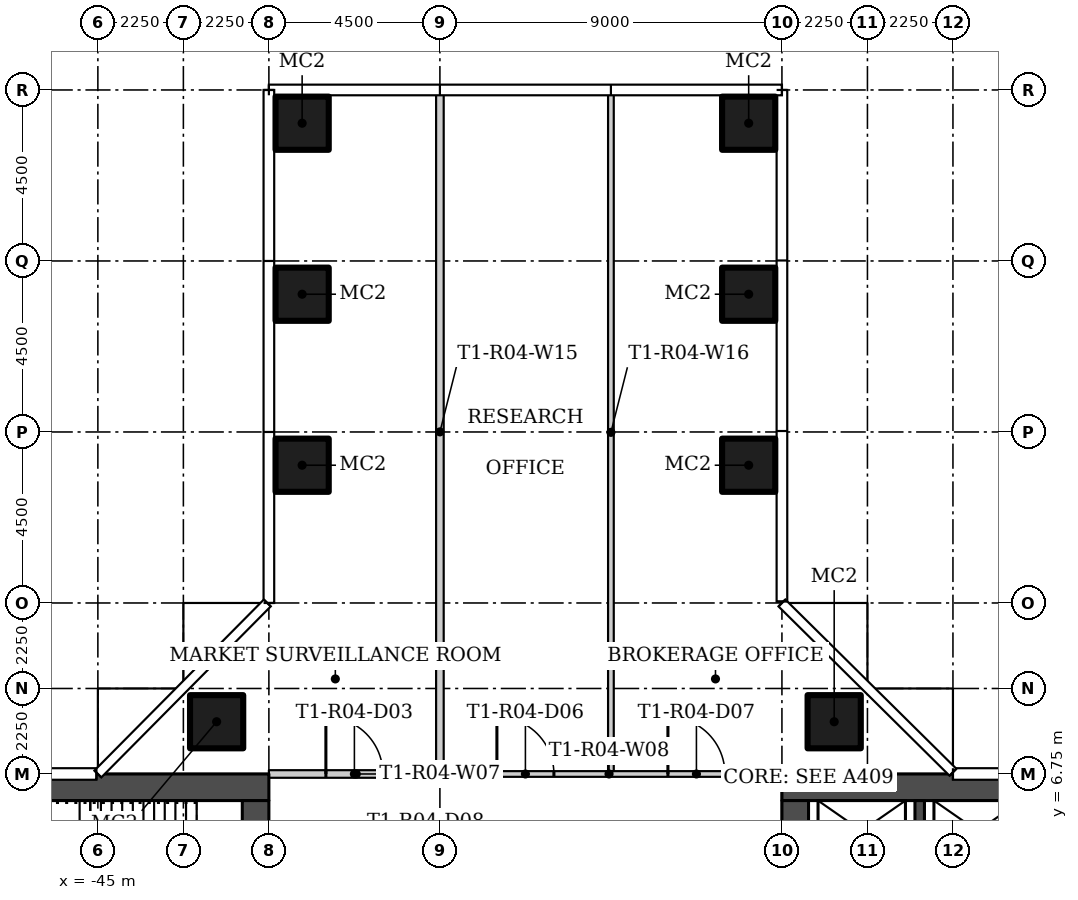
"""IFC4 building model, lengths in metres.
Left out: names, types, materials, properties, quantities, classifications, styles, units other than length and angle.
Written with IfcOpenShell. Run it as: python <this file> out.ifc"""

import sys

from ifc_helpers import new_model, si_unit, direction, frame, frame_2d, origin, origin_2d, place, context, subcontext, project, spatial, rectangle, hollow_rectangle, extrude, element, fill, save


model = new_model("IFC4")
c1 = context("Model", 3, precision=1e-05, world=origin(), true_north=direction((0.0, 1.0)))
c2 = subcontext(c1, "Body", "Model", "MODEL_VIEW")
j1 = project(units=[si_unit("LENGTHUNIT", "METRE"), si_unit("PLANEANGLEUNIT", "RADIAN")], contexts=[c1])
p1 = place(None, origin())
s1 = spatial("IfcSite", under=j1, at=p1, CompositionType="ELEMENT")
p2 = place(p1, origin())
s2 = spatial("IfcBuilding", under=s1, at=p2, CompositionType="ELEMENT")
p3 = place(p2, frame((0.0, 0.0, 49.8)))
s3 = spatial("IfcBuildingStorey", under=s2, at=p3, CompositionType="ELEMENT", Elevation=49.8)
for number, where in (
    (1, (-25.625, 8.125, 0.0)),
    (2, (-41.875, 8.125, 0.0)),
    (3, (-39.625, 14.875, 0.0)),
    (4, (-39.625, 19.375, 0.0)),
    (5, (-39.625, 23.875, 0.0)),
    (6, (-27.875, 14.875, 0.0)),
    (7, (-27.875, 19.375, 0.0)),
    (8, (-27.875, 23.875, 0.0)),
):
    element("IfcColumn", number, at=place(p3, frame(where)), inside=s3, PredefinedType="COLUMN", context=c2, shape_type="SweptSolid", body=[
        extrude(hollow_rectangle(XDim=1.4, YDim=1.4, WallThickness=0.05, at=origin_2d()), origin(), (0.0, 0.0, 1.0), 3.55),
    ])
p4 = place(p3, frame((-40.5, 6.75, 0.0)))
e9 = element("IfcWall", 9, at=p4, inside=s3, PredefinedType="PARTITIONING", context=c2, shape_type="SweptSolid", body=[
    extrude(rectangle(XDim=4.6, YDim=0.2, at=frame_2d((2.3, 0.0))), origin(), (0.0, 0.0, 1.0), 3.55),
])
p5 = place(p4, frame((1.5, 0.0, 0.0)))
e10 = element("IfcOpeningElement", 10, at=p5, cuts=e9, PredefinedType="OPENING", context=c2, shape_type="SweptSolid", body=[
    extrude(rectangle(XDim=1.5, YDim=2.1, at=frame_2d((0.75, 1.05))), frame((0.0, 0.11, 0.0), z_axis=(0.0, -1.0, 0.0), x_axis=(1.0, 0.0, 0.0)), (0.0, 0.0, 1.0), 0.22),
])
p6 = place(p3, frame((-36.1, 6.75, 0.0)))
e11 = element("IfcWall", 11, at=p6, inside=s3, PredefinedType="PARTITIONING", context=c2, shape_type="SweptSolid", body=[
    extrude(rectangle(XDim=9.1, YDim=0.15, at=frame_2d((4.55, 0.0))), origin(), (0.0, 0.0, 1.0), 3.55),
])
p7 = place(p6, frame((1.6, 0.0, 0.0)))
e12 = element("IfcOpeningElement", 12, at=p7, cuts=e11, PredefinedType="OPENING", context=c2, shape_type="SweptSolid", body=[
    extrude(rectangle(XDim=1.5, YDim=2.1, at=frame_2d((0.75, 1.05))), frame((0.0, 0.085, 0.0), z_axis=(0.0, -1.0, 0.0), x_axis=(1.0, 0.0, 0.0)), (0.0, 0.0, 1.0), 0.17),
])
p8 = place(p6, frame((6.1, 0.0, 0.0)))
e13 = element("IfcOpeningElement", 13, at=p8, cuts=e11, PredefinedType="OPENING", context=c2, shape_type="SweptSolid", body=[
    extrude(rectangle(XDim=1.5, YDim=2.1, at=frame_2d((0.75, 1.05))), frame((0.0, 0.085, 0.0), z_axis=(0.0, -1.0, 0.0), x_axis=(1.0, 0.0, 0.0)), (0.0, 0.0, 1.0), 0.17),
])
p9 = place(p3, frame((-36.0, 6.85, 0.0), z_axis=(0.0, 0.0, 1.0), x_axis=(0.0, 1.0, 0.0)))
e14 = element("IfcWall", 14, at=p9, inside=s3, PredefinedType="PARTITIONING", context=c2, shape_type="SweptSolid", body=[
    extrude(rectangle(XDim=17.805, YDim=0.2, at=frame_2d((8.902, 0.0))), origin(), (0.0, 0.0, 1.0), 3.55),
])
p10 = place(p3, frame((-31.5, 6.825, 0.0), z_axis=(0.0, 0.0, 1.0), x_axis=(0.0, 1.0, 0.0)))
e15 = element("IfcWall", 15, at=p10, inside=s3, PredefinedType="PARTITIONING", context=c2, shape_type="SweptSolid", body=[
    extrude(rectangle(XDim=17.83, YDim=0.15, at=frame_2d((8.915, 0.0))), origin(), (0.0, 0.0, 1.0), 3.55),
])
p11 = place(p3, frame((-27.0, 6.4, 0.0)))
e16 = element("IfcWall", 16, at=p11, inside=s3, PredefinedType="SHEAR", context=c2, shape_type="SweptSolid", body=[
    extrude(rectangle(XDim=13.5, YDim=0.7, at=frame_2d((6.75, 0.0))), origin(), (0.0, 0.0, 1.0), 3.55),
])
p12 = place(p3, frame((-26.65, 6.05, 0.0), z_axis=(0.0, 0.0, 1.0), x_axis=(0.0, -1.0, 0.0)))
e17 = element("IfcWall", 17, at=p12, inside=s3, PredefinedType="SHEAR", context=c2, shape_type="SweptSolid", body=[
    extrude(rectangle(XDim=12.1, YDim=0.7, at=frame_2d((6.05, 0.0))), origin(), (0.0, 0.0, 1.0), 3.55),
])
p13 = place(p12, frame((3.9, 0.0, 0.0)))
e18 = element("IfcOpeningElement", 18, at=p13, cuts=e17, PredefinedType="OPENING", context=c2, shape_type="SweptSolid", body=[
    extrude(rectangle(XDim=1.8, YDim=2.4, at=frame_2d((0.9, 1.2))), frame((0.0, 0.36, 0.0), z_axis=(0.0, -1.0, 0.0), x_axis=(1.0, 0.0, 0.0)), (0.0, 0.0, 1.0), 0.72),
])
p14 = place(p3, frame((-23.375, 3.25, 0.0), z_axis=(0.0, 0.0, 1.0), x_axis=(0.0, 1.0, 0.0)))
e19 = element("IfcWall", 19, at=p14, inside=s3, PredefinedType="SHEAR", context=c2, shape_type="SweptSolid", body=[
    extrude(rectangle(XDim=2.8, YDim=0.25, at=frame_2d((1.4, 0.0))), origin(), (0.0, 0.0, 1.0), 3.55),
])
p15 = place(p3, frame((-40.5, 6.4, 0.0), z_axis=(0.0, 0.0, 1.0), x_axis=(-1.0, 0.0, 0.0)))
e20 = element("IfcWall", 20, at=p15, inside=s3, PredefinedType="SHEAR", context=c2, shape_type="SweptSolid", body=[
    extrude(rectangle(XDim=13.5, YDim=0.7, at=frame_2d((6.75, 0.0))), origin(), (0.0, 0.0, 1.0), 3.55),
])
p16 = place(p3, frame((-40.85, -6.05, 0.0), z_axis=(0.0, 0.0, 1.0), x_axis=(0.0, 1.0, 0.0)))
e21 = element("IfcWall", 21, at=p16, inside=s3, PredefinedType="SHEAR", context=c2, shape_type="SweptSolid", body=[
    extrude(rectangle(XDim=12.1, YDim=0.7, at=frame_2d((6.05, 0.0))), origin(), (0.0, 0.0, 1.0), 3.55),
])
p17 = place(p16, frame((6.4, 0.0, 0.0)))
e22 = element("IfcOpeningElement", 22, at=p17, cuts=e21, PredefinedType="OPENING", context=c2, shape_type="SweptSolid", body=[
    extrude(rectangle(XDim=1.8, YDim=2.4, at=frame_2d((0.9, 1.2))), frame((0.0, 0.36, 0.0), z_axis=(0.0, -1.0, 0.0), x_axis=(1.0, 0.0, 0.0)), (0.0, 0.0, 1.0), 0.72),
])
p18 = place(p5, origin())
e23 = element("IfcDoor", 23, at=p18, inside=s3, OperationType="DOUBLE_DOOR_SINGLE_SWING", PredefinedType="DOOR", context=c2, shape_type="SweptSolid", body=[
    extrude(rectangle(XDim=1.5, YDim=2.1, at=frame_2d((0.75, 1.05))), frame((0.0, 0.025, 0.0), z_axis=(0.0, -1.0, 0.0), x_axis=(1.0, 0.0, 0.0)), (0.0, 0.0, 1.0), 0.05),
])
fill(e10, e23)
p19 = place(p7, origin())
e24 = element("IfcDoor", 24, at=p19, inside=s3, OperationType="DOUBLE_DOOR_SINGLE_SWING", PredefinedType="DOOR", context=c2, shape_type="SweptSolid", body=[
    extrude(rectangle(XDim=1.5, YDim=2.1, at=frame_2d((0.75, 1.05))), frame((0.0, 0.025, 0.0), z_axis=(0.0, -1.0, 0.0), x_axis=(1.0, 0.0, 0.0)), (0.0, 0.0, 1.0), 0.05),
])
fill(e12, e24)
p20 = place(p8, origin())
e25 = element("IfcDoor", 25, at=p20, inside=s3, OperationType="DOUBLE_DOOR_SINGLE_SWING", PredefinedType="DOOR", context=c2, shape_type="SweptSolid", body=[
    extrude(rectangle(XDim=1.5, YDim=2.1, at=frame_2d((0.75, 1.05))), frame((0.0, 0.025, 0.0), z_axis=(0.0, -1.0, 0.0), x_axis=(1.0, 0.0, 0.0)), (0.0, 0.0, 1.0), 0.05),
])
fill(e13, e25)
save(model, sys.argv[1])
